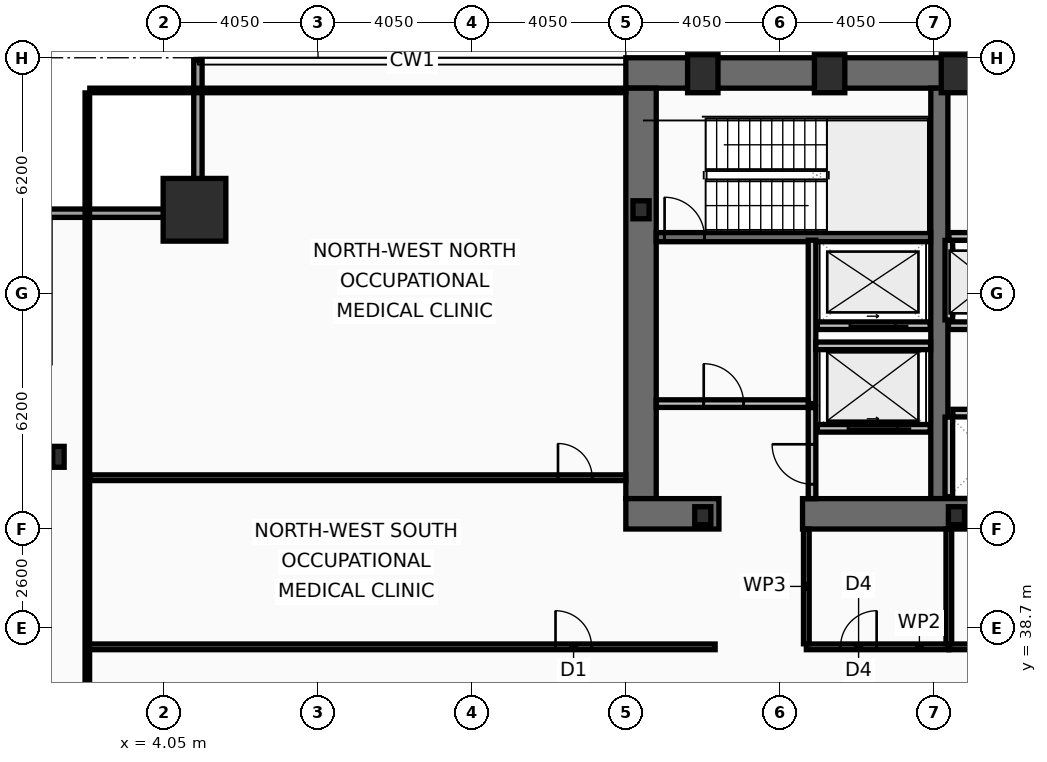
"""IFC4 building model, lengths in metres.
Left out: names, types, materials, properties, quantities, classifications, styles, units other than length and angle.
Written with IfcOpenShell. Run it as: python <this file> out.ifc"""

import sys

from ifc_helpers import new_model, si_unit, direction, frame, frame_2d, origin, origin_2d, place, context, subcontext, project, spatial, rectangle, hollow_rectangle, i_section, extrude, element, fill, save


model = new_model("IFC4")
c1 = context("Model", 3, precision=1e-05, world=origin(), true_north=direction((0.0, 1.0)))
c2 = subcontext(c1, "Body", "Model", "MODEL_VIEW")
j1 = project(units=[si_unit("LENGTHUNIT", "METRE"), si_unit("PLANEANGLEUNIT", "RADIAN")], contexts=[c1])
p1 = place(None, origin())
s1 = spatial("IfcSite", under=j1, at=p1, CompositionType="ELEMENT")
p2 = place(p1, origin())
s2 = spatial("IfcBuilding", under=s1, at=p2, CompositionType="ELEMENT")
p3 = place(p2, frame((0.0, 0.0, 41.8)))
s3 = spatial("IfcBuildingStorey", under=s2, at=p3, CompositionType="ELEMENT", Elevation=41.8)
p4 = place(p3, frame((16.2, 53.3, 0.0), z_axis=(0.0, 0.0, 1.0), x_axis=(1.0, 0.0, 0.0)))
e1 = element("IfcWall", 1, at=p4, inside=s3, PredefinedType="SHEAR", context=c2, shape_type="SweptSolid", body=[
    extrude(rectangle(XDim=40.5, YDim=0.8, at=frame_2d((20.25, 0.0))), origin(), (0.0, 0.0, 1.0), 3.82),
])
p5 = place(p3, frame((16.6, 42.1, 0.0), z_axis=(0.0, 0.0, 1.0), x_axis=(0.0, 1.0, 0.0)))
e2 = element("IfcWall", 2, at=p5, inside=s3, PredefinedType="SHEAR", context=c2, shape_type="SweptSolid", body=[
    extrude(rectangle(XDim=10.8, YDim=0.8, at=frame_2d((5.4, 0.0))), origin(), (0.0, 0.0, 1.0), 3.82),
])
p6 = place(p3, frame((24.45, 42.1, 0.0), z_axis=(0.0, 0.0, 1.0), x_axis=(0.0, 1.0, 0.0)))
e3 = element("IfcWall", 3, at=p6, inside=s3, PredefinedType="SHEAR", context=c2, shape_type="SweptSolid", body=[
    extrude(rectangle(XDim=10.8, YDim=0.45, at=frame_2d((5.4, 0.0))), origin(), (0.0, 0.0, 1.0), 3.82),
])
p7 = place(p3, frame((18.65, 41.7, 0.0), z_axis=(0.0, 0.0, 1.0), x_axis=(-1.0, 0.0, 0.0)))
e4 = element("IfcWall", 4, at=p7, inside=s3, PredefinedType="SHEAR", context=c2, shape_type="SweptSolid", body=[
    extrude(rectangle(XDim=2.45, YDim=0.8, at=frame_2d((1.225, 0.0))), origin(), (0.0, 0.0, 1.0), 3.82),
])
p8 = place(p3, frame((32.3, 41.7, 0.0), z_axis=(0.0, 0.0, 1.0), x_axis=(-1.0, 0.0, 0.0)))
e5 = element("IfcWall", 5, at=p8, inside=s3, PredefinedType="SHEAR", context=c2, shape_type="SweptSolid", body=[
    extrude(rectangle(XDim=11.45, YDim=0.8, at=frame_2d((5.725, 0.0))), origin(), (0.0, 0.0, 1.0), 3.82),
])
p9 = place(p3, frame((17.0, 48.98, 0.0), z_axis=(0.0, 0.0, 1.0), x_axis=(1.0, 0.0, 0.0)))
e6 = element("IfcWall", 6, at=p9, inside=s3, PredefinedType="SHEAR", context=c2, shape_type="SweptSolid", body=[
    extrude(rectangle(XDim=7.22, YDim=0.24, at=frame_2d((3.61, 0.0))), origin(), (0.0, 0.0, 1.0), 3.82),
])
p10 = place(p9, frame((0.22, 0.0, 0.0)))
e7 = element("IfcOpeningElement", 7, at=p10, cuts=e6, PredefinedType="OPENING", context=c2, shape_type="SweptSolid", body=[
    extrude(rectangle(XDim=1.05, YDim=2.15, at=frame_2d((0.525, 1.075))), frame((0.0, 0.13, 0.0), z_axis=(0.0, -1.0, 0.0), x_axis=(1.0, 0.0, 0.0)), (0.0, 0.0, 1.0), 0.26),
])
p11 = place(p3, frame((4.85, 49.7, 0.0), z_axis=(0.0, 0.0, 1.0), x_axis=(1.0, 0.0, 0.0)))
e8 = element("IfcColumn", 8, at=p11, inside=s3, PredefinedType="COLUMN", context=c2, shape_type="SweptSolid", body=[
    extrude(hollow_rectangle(XDim=1.65, YDim=1.65, WallThickness=0.075, at=origin_2d()), origin(), (0.0, 0.0, 1.0), 4.0),
])
for number, where, z_axis, x_axis in (
    (9, (18.225, 53.28, 0.0), (0.0, 0.0, 1.0), (1.0, 0.0, 0.0)),
    (10, (21.562, 53.28, 0.0), (0.0, 0.0, 1.0), (1.0, 0.0, 0.0)),
    (11, (24.9, 53.28, 0.0), (0.0, 0.0, 1.0), (1.0, 0.0, 0.0)),
):
    element("IfcColumn", number, at=place(p3, frame(where, z_axis=z_axis, x_axis=x_axis)), inside=s3, PredefinedType="COLUMN", context=c2, shape_type="SweptSolid", body=[
        extrude(hollow_rectangle(XDim=0.8, YDim=1.0, WallThickness=0.055, at=origin_2d()), origin(), (0.0, 0.0, 1.0), 4.0),
    ])
p12 = place(p3, frame((1.27, 43.2, 0.0), z_axis=(0.0, 0.0, 1.0), x_axis=(1.0, 0.0, 0.0)))
e12 = element("IfcColumn", 12, at=p12, inside=s3, PredefinedType="COLUMN", context=c2, shape_type="SweptSolid", body=[
    extrude(i_section(OverallWidth=0.3, OverallDepth=0.55, WebThickness=0.015, FlangeThickness=0.029, at=origin_2d()), origin(), (0.0, 0.0, 1.0), 4.0),
])
for number, where, z_axis, x_axis in (
    (13, (16.6, 49.7, 0.0), (0.0, 0.0, 1.0), (1.0, 0.0, 0.0)),
    (14, (18.225, 41.65, 0.0), (0.0, 0.0, 1.0), (1.0, 0.0, 0.0)),
    (15, (24.9, 41.65, 0.0), (0.0, 0.0, 1.0), (1.0, 0.0, 0.0)),
):
    element("IfcColumn", number, at=place(p3, frame(where, z_axis=z_axis, x_axis=x_axis)), inside=s3, PredefinedType="COLUMN", context=c2, shape_type="SweptSolid", body=[
        extrude(i_section(OverallWidth=0.424, OverallDepth=0.474, WebThickness=0.048, FlangeThickness=0.077, at=origin_2d()), origin(), (0.0, 0.0, 1.0), 4.0),
    ])
p13 = place(p3, frame((0.83, 49.61, 0.0), z_axis=(0.0, 0.0, 1.0), x_axis=(1.0, 0.0, 0.0)))
e16 = element("IfcWall", 16, at=p13, inside=s3, PredefinedType="SOLIDWALL", context=c2, shape_type="SweptSolid", body=[
    extrude(rectangle(XDim=4.22, YDim=0.22, at=frame_2d((2.11, 0.0))), origin(), (0.0, 0.0, 1.0), 3.16),
])
p14 = place(p3, frame((4.94, 49.72, 0.0), z_axis=(0.0, 0.0, 1.0), x_axis=(0.0, 1.0, 0.0)))
e17 = element("IfcWall", 17, at=p14, inside=s3, PredefinedType="SOLIDWALL", context=c2, shape_type="SweptSolid", body=[
    extrude(rectangle(XDim=3.91, YDim=0.22, at=frame_2d((1.955, 0.0))), origin(), (0.0, 0.0, 1.0), 3.16),
])
p15 = place(p3, frame((24.21, 43.95, 0.0), z_axis=(0.0, 0.0, 1.0), x_axis=(-1.0, 0.0, 0.0)))
e18 = element("IfcWall", 18, at=p15, inside=s3, PredefinedType="PARTITIONING", context=c2, shape_type="SweptSolid", body=[
    extrude(rectangle(XDim=2.97, YDim=0.2, at=frame_2d((1.485, 0.0))), origin(), (0.0, 0.0, 1.0), 3.82),
])
p16 = place(p15, frame((0.86, 0.0, 0.0)))
e19 = element("IfcOpeningElement", 19, at=p16, cuts=e18, PredefinedType="OPENING", context=c2, shape_type="SweptSolid", body=[
    extrude(rectangle(XDim=1.3, YDim=2.18, at=frame_2d((0.65, 1.09))), frame((0.0, 0.11, 0.0), z_axis=(0.0, -1.0, 0.0), x_axis=(1.0, 0.0, 0.0)), (0.0, 0.0, 1.0), 0.22),
])
p17 = place(p3, frame((24.21, 46.65, 0.0), z_axis=(0.0, 0.0, 1.0), x_axis=(-1.0, 0.0, 0.0)))
e20 = element("IfcWall", 20, at=p17, inside=s3, PredefinedType="PARTITIONING", context=c2, shape_type="SweptSolid", body=[
    extrude(rectangle(XDim=2.97, YDim=0.2, at=frame_2d((1.485, 0.0))), origin(), (0.0, 0.0, 1.0), 3.82),
])
p18 = place(p17, frame((0.91, 0.0, 0.0)))
e21 = element("IfcOpeningElement", 21, at=p18, cuts=e20, PredefinedType="OPENING", context=c2, shape_type="SweptSolid", body=[
    extrude(rectangle(XDim=1.2, YDim=2.18, at=frame_2d((0.6, 1.09))), frame((0.0, 0.11, 0.0), z_axis=(0.0, -1.0, 0.0), x_axis=(1.0, 0.0, 0.0)), (0.0, 0.0, 1.0), 0.22),
])
p19 = place(p3, frame((31.22, 46.65, 0.0), z_axis=(0.0, 0.0, 1.0), x_axis=(-1.0, 0.0, 0.0)))
e22 = element("IfcWall", 22, at=p19, inside=s3, PredefinedType="PARTITIONING", context=c2, shape_type="SweptSolid", body=[
    extrude(rectangle(XDim=6.53, YDim=0.2, at=frame_2d((3.265, 0.0))), origin(), (0.0, 0.0, 1.0), 3.82),
])
p20 = place(p19, frame((4.9, 0.0, 0.0)))
e23 = element("IfcOpeningElement", 23, at=p20, cuts=e22, PredefinedType="OPENING", context=c2, shape_type="SweptSolid", body=[
    extrude(rectangle(XDim=1.1, YDim=2.18, at=frame_2d((0.55, 1.09))), frame((0.0, 0.11, 0.0), z_axis=(0.0, -1.0, 0.0), x_axis=(1.0, 0.0, 0.0)), (0.0, 0.0, 1.0), 0.22),
])
p21 = place(p19, frame((2.74, 0.0, 0.0)))
e24 = element("IfcOpeningElement", 24, at=p21, cuts=e22, PredefinedType="OPENING", context=c2, shape_type="SweptSolid", body=[
    extrude(rectangle(XDim=1.1, YDim=2.18, at=frame_2d((0.55, 1.09))), frame((0.0, 0.11, 0.0), z_axis=(0.0, -1.0, 0.0), x_axis=(1.0, 0.0, 0.0)), (0.0, 0.0, 1.0), 0.22),
])
p22 = place(p19, frame((0.58, 0.0, 0.0)))
e25 = element("IfcOpeningElement", 25, at=p22, cuts=e22, PredefinedType="OPENING", context=c2, shape_type="SweptSolid", body=[
    extrude(rectangle(XDim=1.1, YDim=2.18, at=frame_2d((0.55, 1.09))), frame((0.0, 0.11, 0.0), z_axis=(0.0, -1.0, 0.0), x_axis=(1.0, 0.0, 0.0)), (0.0, 0.0, 1.0), 0.22),
])
p23 = place(p3, frame((21.1, 44.6, 0.0), z_axis=(0.0, 0.0, 1.0), x_axis=(0.0, 1.0, 0.0)))
e26 = element("IfcWall", 26, at=p23, inside=s3, PredefinedType="PARTITIONING", context=c2, shape_type="SweptSolid", body=[
    extrude(rectangle(XDim=4.3, YDim=0.2, at=frame_2d((2.15, 0.0))), origin(), (0.0, 0.0, 1.0), 3.82),
])
p24 = place(p3, frame((17.0, 44.6, 0.0), z_axis=(0.0, 0.0, 1.0), x_axis=(1.0, 0.0, 0.0)))
e27 = element("IfcWall", 27, at=p24, inside=s3, PredefinedType="PARTITIONING", context=c2, shape_type="SweptSolid", body=[
    extrude(rectangle(XDim=4.0, YDim=0.2, at=frame_2d((2.0, 0.0))), origin(), (0.0, 0.0, 1.0), 3.82),
])
p25 = place(p24, frame((1.25, 0.0, 0.0)))
e28 = element("IfcOpeningElement", 28, at=p25, cuts=e27, PredefinedType="OPENING", context=c2, shape_type="SweptSolid", body=[
    extrude(rectangle(XDim=1.05, YDim=2.15, at=frame_2d((0.525, 1.075))), frame((0.0, 0.11, 0.0), z_axis=(0.0, -1.0, 0.0), x_axis=(1.0, 0.0, 0.0)), (0.0, 0.0, 1.0), 0.22),
])
p26 = place(p3, frame((21.2, 46.12, 0.0), z_axis=(0.0, 0.0, 1.0), x_axis=(1.0, 0.0, 0.0)))
e29 = element("IfcWall", 29, at=p26, inside=s3, PredefinedType="PARTITIONING", context=c2, shape_type="SweptSolid", body=[
    extrude(rectangle(XDim=3.02, YDim=0.2, at=frame_2d((1.51, 0.0))), origin(), (0.0, 0.0, 1.0), 3.82),
])
p27 = place(p3, frame((21.1, 42.1, 0.0), z_axis=(0.0, 0.0, 1.0), x_axis=(0.0, 1.0, 0.0)))
e30 = element("IfcWall", 30, at=p27, inside=s3, PredefinedType="PARTITIONING", context=c2, shape_type="SweptSolid", body=[
    extrude(rectangle(XDim=2.395, YDim=0.2, at=frame_2d((1.198, 0.0))), origin(), (0.0, 0.0, 1.0), 3.82),
])
p28 = place(p27, frame((0.38, 0.0, 0.0)))
e31 = element("IfcOpeningElement", 31, at=p28, cuts=e30, PredefinedType="OPENING", context=c2, shape_type="SweptSolid", body=[
    extrude(rectangle(XDim=1.05, YDim=2.15, at=frame_2d((0.525, 1.075))), frame((0.0, 0.11, 0.0), z_axis=(0.0, -1.0, 0.0), x_axis=(1.0, 0.0, 0.0)), (0.0, 0.0, 1.0), 0.22),
])
p29 = place(p3, frame((24.7, 46.8, 0.0), z_axis=(0.0, 0.0, 1.0), x_axis=(0.0, 1.0, 0.0)))
e32 = element("IfcWall", 32, at=p29, inside=s3, PredefinedType="PARTITIONING", context=c2, shape_type="SweptSolid", body=[
    extrude(rectangle(XDim=2.095, YDim=0.2, at=frame_2d((1.047, 0.0))), origin(), (0.0, 0.0, 1.0), 3.82),
])
p30 = place(p3, frame((24.805, 44.35, 0.0), z_axis=(0.0, 0.0, 1.0), x_axis=(1.0, 0.0, 0.0)))
e33 = element("IfcWall", 33, at=p30, inside=s3, PredefinedType="PARTITIONING", context=c2, shape_type="SweptSolid", body=[
    extrude(rectangle(XDim=6.27, YDim=0.2, at=frame_2d((3.135, 0.0))), origin(), (0.0, 0.0, 1.0), 3.82),
])
p31 = place(p3, frame((24.7, 42.15, 0.0), z_axis=(0.0, 0.0, 1.0), x_axis=(0.0, 1.0, 0.0)))
e34 = element("IfcWall", 34, at=p31, inside=s3, PredefinedType="PARTITIONING", context=c2, shape_type="SweptSolid", body=[
    extrude(rectangle(XDim=2.095, YDim=0.2, at=frame_2d((1.048, 0.0))), origin(), (0.0, 0.0, 1.0), 3.82),
])
p32 = place(p3, frame((24.7, 52.86, 0.0), z_axis=(0.0, 0.0, 1.0), x_axis=(1.0, 0.0, 0.0)))
e35 = element("IfcWall", 35, at=p32, inside=s3, PredefinedType="PARTITIONING", context=c2, shape_type="SweptSolid", body=[
    extrude(rectangle(XDim=7.72, YDim=0.12, at=frame_2d((3.86, 0.0))), origin(), (0.0, 0.0, 1.0), 3.82),
])
p33 = place(p3, frame((24.7, 49.0, 0.0), z_axis=(0.0, 0.0, 1.0), x_axis=(1.0, 0.0, 0.0)))
e36 = element("IfcWall", 36, at=p33, inside=s3, PredefinedType="PARTITIONING", context=c2, shape_type="SweptSolid", body=[
    extrude(rectangle(XDim=7.72, YDim=0.2, at=frame_2d((3.86, 0.0))), origin(), (0.0, 0.0, 1.0), 3.82),
])
p34 = place(p33, frame((6.56, 0.0, 0.0)))
e37 = element("IfcOpeningElement", 37, at=p34, cuts=e36, PredefinedType="OPENING", context=c2, shape_type="SweptSolid", body=[
    extrude(rectangle(XDim=0.95, YDim=2.1, at=frame_2d((0.475, 1.05))), frame((0.0, 0.11, 0.0), z_axis=(0.0, -1.0, 0.0), x_axis=(1.0, 0.0, 0.0)), (0.0, 0.0, 1.0), 0.22),
])
p35 = place(p3, frame((20.95, 38.2, 0.0), z_axis=(0.0, 0.0, 1.0), x_axis=(1.0, 0.0, 0.0)))
e38 = element("IfcWall", 38, at=p35, inside=s3, PredefinedType="PARTITIONING", context=c2, shape_type="SweptSolid", body=[
    extrude(rectangle(XDim=3.75, YDim=0.15, at=frame_2d((1.875, 0.0))), origin(), (0.0, 0.0, 1.0), 3.01),
])
p36 = place(p35, frame((0.9, 0.0, 0.0)))
e39 = element("IfcOpeningElement", 39, at=p36, cuts=e38, PredefinedType="OPENING", context=c2, shape_type="SweptSolid", body=[
    extrude(rectangle(XDim=0.95, YDim=2.05, at=frame_2d((0.475, 1.025))), frame((0.0, 0.085, 0.0), z_axis=(0.0, -1.0, 0.0), x_axis=(1.0, 0.0, 0.0)), (0.0, 0.0, 1.0), 0.17),
])
p37 = place(p3, frame((24.7, 38.2, 0.0), z_axis=(0.0, 0.0, 1.0), x_axis=(1.0, 0.0, 0.0)))
e40 = element("IfcWall", 40, at=p37, inside=s3, PredefinedType="PARTITIONING", context=c2, shape_type="SweptSolid", body=[
    extrude(rectangle(XDim=3.7, YDim=0.15, at=frame_2d((1.85, 0.0))), origin(), (0.0, 0.0, 1.0), 3.01),
])
p38 = place(p37, frame((0.9, 0.0, 0.0)))
e41 = element("IfcOpeningElement", 41, at=p38, cuts=e40, PredefinedType="OPENING", context=c2, shape_type="SweptSolid", body=[
    extrude(rectangle(XDim=0.95, YDim=2.05, at=frame_2d((0.475, 1.025))), frame((0.0, 0.085, 0.0), z_axis=(0.0, -1.0, 0.0), x_axis=(1.0, 0.0, 0.0)), (0.0, 0.0, 1.0), 0.17),
])
p39 = place(p3, frame((20.95, 38.28, 0.0), z_axis=(0.0, 0.0, 1.0), x_axis=(0.0, 1.0, 0.0)))
e42 = element("IfcWall", 42, at=p39, inside=s3, PredefinedType="PARTITIONING", context=c2, shape_type="SweptSolid", body=[
    extrude(rectangle(XDim=3.02, YDim=0.15, at=frame_2d((1.51, 0.0))), origin(), (0.0, 0.0, 1.0), 3.82),
])
p40 = place(p3, frame((24.7, 38.28, 0.0), z_axis=(0.0, 0.0, 1.0), x_axis=(0.0, 1.0, 0.0)))
e43 = element("IfcWall", 43, at=p40, inside=s3, PredefinedType="PARTITIONING", context=c2, shape_type="SweptSolid", body=[
    extrude(rectangle(XDim=3.02, YDim=0.15, at=frame_2d((1.51, 0.0))), origin(), (0.0, 0.0, 1.0), 3.01),
])
p41 = place(p3, frame((2.03, 38.2, 0.0), z_axis=(0.0, 0.0, 1.0), x_axis=(1.0, 0.0, 0.0)))
e44 = element("IfcWall", 44, at=p41, inside=s3, PredefinedType="PARTITIONING", context=c2, shape_type="SweptSolid", body=[
    extrude(rectangle(XDim=16.52, YDim=0.15, at=frame_2d((8.26, 0.0))), origin(), (0.0, 0.0, 1.0), 3.01),
])
p42 = place(p41, frame((12.32, 0.0, 0.0)))
e45 = element("IfcOpeningElement", 45, at=p42, cuts=e44, PredefinedType="OPENING", context=c2, shape_type="SweptSolid", body=[
    extrude(rectangle(XDim=0.95, YDim=2.05, at=frame_2d((0.475, 1.025))), frame((0.0, 0.085, 0.0), z_axis=(0.0, -1.0, 0.0), x_axis=(1.0, 0.0, 0.0)), (0.0, 0.0, 1.0), 0.17),
])
p43 = place(p3, frame((2.095, 42.65, 0.0), z_axis=(0.0, 0.0, 1.0), x_axis=(1.0, 0.0, 0.0)))
e46 = element("IfcWall", 46, at=p43, inside=s3, PredefinedType="PARTITIONING", context=c2, shape_type="SweptSolid", body=[
    extrude(rectangle(XDim=14.105, YDim=0.15, at=frame_2d((7.052, 0.0))), origin(), (0.0, 0.0, 1.0), 3.01),
])
p44 = place(p43, frame((12.32, 0.0, 0.0)))
e47 = element("IfcOpeningElement", 47, at=p44, cuts=e46, PredefinedType="OPENING", context=c2, shape_type="SweptSolid", body=[
    extrude(rectangle(XDim=0.9, YDim=2.05, at=frame_2d((0.45, 1.025))), frame((0.0, 0.085, 0.0), z_axis=(0.0, -1.0, 0.0), x_axis=(1.0, 0.0, 0.0)), (0.0, 0.0, 1.0), 0.17),
])
p45 = place(p3, frame((2.03, 10.665, 0.0), z_axis=(0.0, 0.0, 1.0), x_axis=(0.0, 1.0, 0.0)))
e48 = element("IfcWall", 48, at=p45, inside=s3, PredefinedType="PARTITIONING", context=c2, shape_type="SweptSolid", body=[
    extrude(rectangle(XDim=42.11, YDim=0.12, at=frame_2d((21.055, 0.0))), origin(), (0.0, 0.0, 1.0), 3.01),
])
p46 = place(p3, frame((2.095, 52.84, 0.0), z_axis=(0.0, 0.0, 1.0), x_axis=(1.0, 0.0, 0.0)))
e49 = element("IfcWall", 49, at=p46, inside=s3, PredefinedType="PARTITIONING", context=c2, shape_type="SweptSolid", body=[
    extrude(rectangle(XDim=14.105, YDim=0.12, at=frame_2d((7.052, 0.0))), origin(), (0.0, 0.0, 1.0), 3.82),
])
p47 = place(p10, origin())
e50 = element("IfcDoor", 50, at=p47, inside=s3, OperationType="SINGLE_SWING_LEFT", PredefinedType="DOOR", context=c2, shape_type="SweptSolid", body=[
    extrude(rectangle(XDim=1.05, YDim=2.15, at=frame_2d((0.525, 1.075))), frame((0.0, 0.025, 0.0), z_axis=(0.0, -1.0, 0.0), x_axis=(1.0, 0.0, 0.0)), (0.0, 0.0, 1.0), 0.05),
])
fill(e7, e50)
p48 = place(p16, origin())
e51 = element("IfcDoor", 51, at=p48, inside=s3, OperationType="SLIDING_TO_LEFT", PredefinedType="DOOR", context=c2, shape_type="SweptSolid", body=[
    extrude(rectangle(XDim=1.3, YDim=2.18, at=frame_2d((0.65, 1.09))), frame((0.0, 0.025, 0.0), z_axis=(0.0, -1.0, 0.0), x_axis=(1.0, 0.0, 0.0)), (0.0, 0.0, 1.0), 0.05),
])
fill(e19, e51)
p49 = place(p18, origin())
e52 = element("IfcDoor", 52, at=p49, inside=s3, OperationType="SLIDING_TO_LEFT", PredefinedType="DOOR", context=c2, shape_type="SweptSolid", body=[
    extrude(rectangle(XDim=1.2, YDim=2.18, at=frame_2d((0.6, 1.09))), frame((0.0, 0.025, 0.0), z_axis=(0.0, -1.0, 0.0), x_axis=(1.0, 0.0, 0.0)), (0.0, 0.0, 1.0), 0.05),
])
fill(e21, e52)
p50 = place(p25, origin())
e53 = element("IfcDoor", 53, at=p50, inside=s3, OperationType="SINGLE_SWING_LEFT", PredefinedType="DOOR", context=c2, shape_type="SweptSolid", body=[
    extrude(rectangle(XDim=1.05, YDim=2.15, at=frame_2d((0.525, 1.075))), frame((0.0, 0.025, 0.0), z_axis=(0.0, -1.0, 0.0), x_axis=(1.0, 0.0, 0.0)), (0.0, 0.0, 1.0), 0.05),
])
fill(e28, e53)
p51 = place(p28, origin())
e54 = element("IfcDoor", 54, at=p51, inside=s3, OperationType="SINGLE_SWING_RIGHT", PredefinedType="DOOR", context=c2, shape_type="SweptSolid", body=[
    extrude(rectangle(XDim=1.05, YDim=2.15, at=frame_2d((0.525, 1.075))), frame((0.0, 0.025, 0.0), z_axis=(0.0, -1.0, 0.0), x_axis=(1.0, 0.0, 0.0)), (0.0, 0.0, 1.0), 0.05),
])
fill(e31, e54)
p52 = place(p36, origin())
e55 = element("IfcDoor", 55, at=p52, inside=s3, OperationType="SINGLE_SWING_RIGHT", PredefinedType="DOOR", context=c2, shape_type="SweptSolid", body=[
    extrude(rectangle(XDim=0.95, YDim=2.05, at=frame_2d((0.475, 1.025))), frame((0.0, 0.025, 0.0), z_axis=(0.0, -1.0, 0.0), x_axis=(1.0, 0.0, 0.0)), (0.0, 0.0, 1.0), 0.05),
])
fill(e39, e55)
p53 = place(p42, origin())
e56 = element("IfcDoor", 56, at=p53, inside=s3, OperationType="SINGLE_SWING_LEFT", PredefinedType="DOOR", context=c2, shape_type="SweptSolid", body=[
    extrude(rectangle(XDim=0.95, YDim=2.05, at=frame_2d((0.475, 1.025))), frame((0.0, 0.025, 0.0), z_axis=(0.0, -1.0, 0.0), x_axis=(1.0, 0.0, 0.0)), (0.0, 0.0, 1.0), 0.05),
])
fill(e45, e56)
p54 = place(p44, origin())
e57 = element("IfcDoor", 57, at=p54, inside=s3, OperationType="SINGLE_SWING_LEFT", PredefinedType="DOOR", context=c2, shape_type="SweptSolid", body=[
    extrude(rectangle(XDim=0.9, YDim=2.05, at=frame_2d((0.45, 1.025))), frame((0.0, 0.025, 0.0), z_axis=(0.0, -1.0, 0.0), x_axis=(1.0, 0.0, 0.0)), (0.0, 0.0, 1.0), 0.05),
])
fill(e47, e57)
save(model, sys.argv[1])
